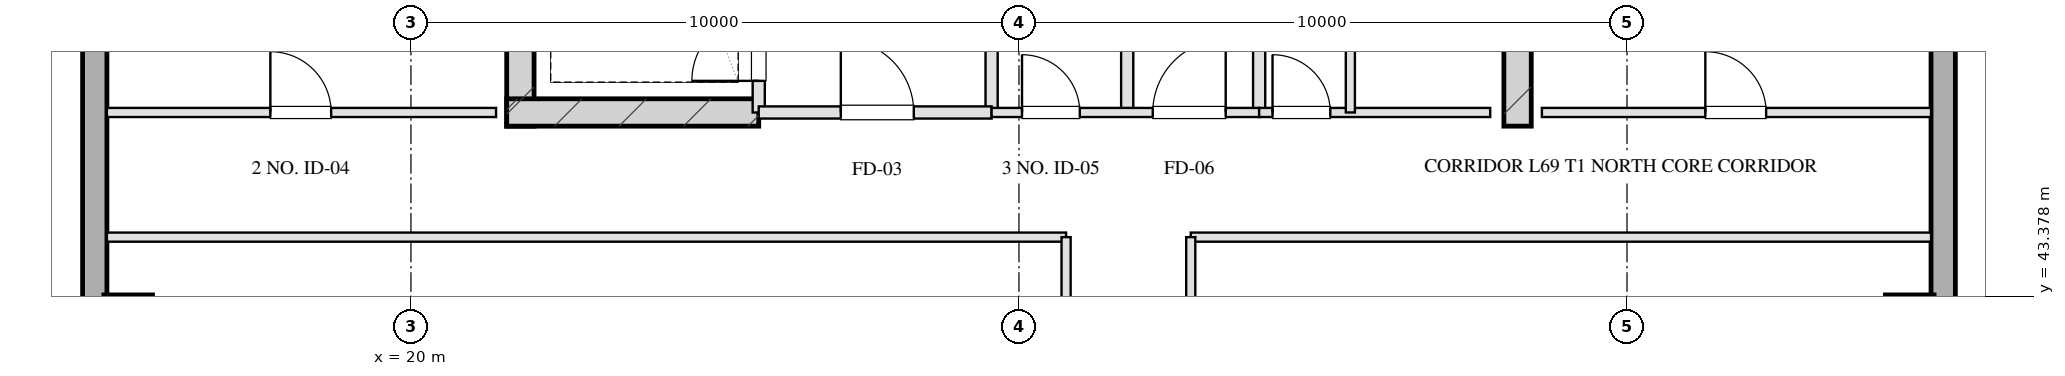
"""IFC4 building model, lengths in metres.
Left out: names, types, materials, properties, quantities, classifications, styles, units other than length and angle.
Written with IfcOpenShell. Run it as: python <this file> out.ifc"""

import sys

from ifc_helpers import new_model, si_unit, direction, frame, frame_2d, origin, origin_2d, place, context, subcontext, project, spatial, rectangle, hollow_rectangle, extrude, element, fill, save


model = new_model("IFC4")
c1 = context("Model", 3, precision=1e-05, world=origin(), true_north=direction((0.0, 1.0)))
c2 = subcontext(c1, "Body", "Model", "MODEL_VIEW")
j1 = project(units=[si_unit("LENGTHUNIT", "METRE"), si_unit("PLANEANGLEUNIT", "RADIAN")], contexts=[c1])
p1 = place(None, origin())
s1 = spatial("IfcSite", under=j1, at=p1, CompositionType="ELEMENT")
p2 = place(p1, origin())
s2 = spatial("IfcBuilding", under=s1, at=p2, CompositionType="ELEMENT")
p3 = place(p2, frame((0.0, 0.0, 253.6)))
s3 = spatial("IfcBuildingStorey", under=s2, at=p3, CompositionType="ELEMENT", Elevation=253.6)
for number, where, z_axis, x_axis in (
    (1, (21.8, 46.175, 0.0), (0.0, 0.0, 1.0), (0.0, 1.0, 0.0)),
    (2, (38.2, 46.175, 0.0), (0.0, 0.0, 1.0), (0.0, 1.0, 0.0)),
):
    element("IfcWall", number, at=place(p3, frame(where, z_axis=z_axis, x_axis=x_axis)), inside=s3, PredefinedType="SHEAR", context=c2, shape_type="SweptSolid", body=[
        extrude(rectangle(XDim=9.33, YDim=0.45, at=frame_2d((4.665, 0.0))), origin(), (0.0, 0.0, 1.0), 3.2),
    ])
p4 = place(p3, frame((21.575, 46.4, 0.0), z_axis=(0.0, 0.0, 1.0), x_axis=(1.0, 0.0, 0.0)))
e3 = element("IfcWall", 3, at=p4, inside=s3, PredefinedType="SHEAR", context=c2, shape_type="SweptSolid", body=[
    extrude(rectangle(XDim=4.145, YDim=0.45, at=frame_2d((2.073, 0.0))), origin(), (0.0, 0.0, 1.0), 3.2),
])
for number, where, z_axis, x_axis in (
    (4, (15.35, 43.0, 0.0), (0.0, 0.0, 1.0), (1.0, 0.0, 0.0)),
    (5, (44.65, 43.0, 0.0), (0.0, 0.0, 1.0), (1.0, 0.0, 0.0)),
):
    element("IfcColumn", number, at=place(p3, frame(where, z_axis=z_axis, x_axis=x_axis)), inside=s3, PredefinedType="COLUMN", context=c2, shape_type="SweptSolid", body=[
        extrude(hollow_rectangle(XDim=0.8, YDim=0.8, WallThickness=0.028, at=origin_2d()), origin(), (0.0, 0.0, 1.0), 3.201),
    ])
p5 = place(p3, frame((14.8, 13.1, 0.0), z_axis=(0.0, 0.0, 1.0), x_axis=(0.0, 1.0, 0.0)))
e6 = element("IfcWall", 6, at=p5, inside=s3, PredefinedType="SOLIDWALL", context=c2, shape_type="SweptSolid", body=[
    extrude(rectangle(XDim=41.8, YDim=0.4, at=frame_2d((20.9, 0.0))), origin(), (0.0, 0.0, 1.0), 2.36),
])
p6 = place(p5, frame((13.525, 0.0, 0.75)))
e7 = element("IfcOpeningElement", 7, at=p6, cuts=e6, PredefinedType="OPENING", context=c2, shape_type="SweptSolid", body=[
    extrude(rectangle(XDim=1.95, YDim=1.21, at=frame_2d((0.975, 0.605))), frame((0.0, 0.21, 0.0), z_axis=(0.0, -1.0, 0.0), x_axis=(1.0, 0.0, 0.0)), (0.0, 0.0, 1.0), 0.42),
])
p7 = place(p5, frame((17.325, 0.0, 0.75)))
e8 = element("IfcOpeningElement", 8, at=p7, cuts=e6, PredefinedType="OPENING", context=c2, shape_type="SweptSolid", body=[
    extrude(rectangle(XDim=1.95, YDim=1.21, at=frame_2d((0.975, 0.605))), frame((0.0, 0.21, 0.0), z_axis=(0.0, -1.0, 0.0), x_axis=(1.0, 0.0, 0.0)), (0.0, 0.0, 1.0), 0.42),
])
p8 = place(p5, frame((22.525, 0.0, 0.75)))
e9 = element("IfcOpeningElement", 9, at=p8, cuts=e6, PredefinedType="OPENING", context=c2, shape_type="SweptSolid", body=[
    extrude(rectangle(XDim=1.95, YDim=1.21, at=frame_2d((0.975, 0.605))), frame((0.0, 0.21, 0.0), z_axis=(0.0, -1.0, 0.0), x_axis=(1.0, 0.0, 0.0)), (0.0, 0.0, 1.0), 0.42),
])
p9 = place(p5, frame((26.325, 0.0, 0.75)))
e10 = element("IfcOpeningElement", 10, at=p9, cuts=e6, PredefinedType="OPENING", context=c2, shape_type="SweptSolid", body=[
    extrude(rectangle(XDim=1.95, YDim=1.21, at=frame_2d((0.975, 0.605))), frame((0.0, 0.21, 0.0), z_axis=(0.0, -1.0, 0.0), x_axis=(1.0, 0.0, 0.0)), (0.0, 0.0, 1.0), 0.42),
])
p10 = place(p3, frame((45.2, 54.9, 0.0), z_axis=(0.0, 0.0, 1.0), x_axis=(0.0, -1.0, 0.0)))
e11 = element("IfcWall", 11, at=p10, inside=s3, PredefinedType="SOLIDWALL", context=c2, shape_type="SweptSolid", body=[
    extrude(rectangle(XDim=41.8, YDim=0.4, at=frame_2d((20.9, 0.0))), origin(), (0.0, 0.0, 1.0), 2.36),
])
p11 = place(p10, frame((26.325, 0.0, 0.75)))
e12 = element("IfcOpeningElement", 12, at=p11, cuts=e11, PredefinedType="OPENING", context=c2, shape_type="SweptSolid", body=[
    extrude(rectangle(XDim=1.95, YDim=1.21, at=frame_2d((0.975, 0.605))), frame((0.0, 0.21, 0.0), z_axis=(0.0, -1.0, 0.0), x_axis=(1.0, 0.0, 0.0)), (0.0, 0.0, 1.0), 0.42),
])
p12 = place(p10, frame((22.525, 0.0, 0.75)))
e13 = element("IfcOpeningElement", 13, at=p12, cuts=e11, PredefinedType="OPENING", context=c2, shape_type="SweptSolid", body=[
    extrude(rectangle(XDim=1.95, YDim=1.21, at=frame_2d((0.975, 0.605))), frame((0.0, 0.21, 0.0), z_axis=(0.0, -1.0, 0.0), x_axis=(1.0, 0.0, 0.0)), (0.0, 0.0, 1.0), 0.42),
])
p13 = place(p10, frame((17.325, 0.0, 0.75)))
e14 = element("IfcOpeningElement", 14, at=p13, cuts=e11, PredefinedType="OPENING", context=c2, shape_type="SweptSolid", body=[
    extrude(rectangle(XDim=1.95, YDim=1.21, at=frame_2d((0.975, 0.605))), frame((0.0, 0.21, 0.0), z_axis=(0.0, -1.0, 0.0), x_axis=(1.0, 0.0, 0.0)), (0.0, 0.0, 1.0), 0.42),
])
p14 = place(p10, frame((13.525, 0.0, 0.75)))
e15 = element("IfcOpeningElement", 15, at=p14, cuts=e11, PredefinedType="OPENING", context=c2, shape_type="SweptSolid", body=[
    extrude(rectangle(XDim=1.95, YDim=1.21, at=frame_2d((0.975, 0.605))), frame((0.0, 0.21, 0.0), z_axis=(0.0, -1.0, 0.0), x_axis=(1.0, 0.0, 0.0)), (0.0, 0.0, 1.0), 0.42),
])
p15 = place(p3, frame((25.72, 46.4, 0.0), z_axis=(0.0, 0.0, 1.0), x_axis=(0.0, 1.0, 0.0)))
e16 = element("IfcWall", 16, at=p15, inside=s3, PredefinedType="PARTITIONING", context=c2, shape_type="SweptSolid", body=[
    extrude(rectangle(XDim=1.9, YDim=0.2, at=frame_2d((0.95, 0.0))), origin(), (0.0, 0.0, 1.0), 2.925),
])
p16 = place(p15, frame((0.52, 0.0, 0.0)))
e17 = element("IfcOpeningElement", 17, at=p16, cuts=e16, PredefinedType="OPENING", context=c2, shape_type="SweptSolid", body=[
    extrude(rectangle(XDim=1.1, YDim=2.05, at=frame_2d((0.55, 1.025))), frame((0.0, 0.11, 0.0), z_axis=(0.0, -1.0, 0.0), x_axis=(1.0, 0.0, 0.0)), (0.0, 0.0, 1.0), 0.22),
])
p17 = place(p3, frame((29.55, 46.4, 0.0), z_axis=(0.0, 0.0, 1.0), x_axis=(0.0, 1.0, 0.0)))
e18 = element("IfcWall", 18, at=p17, inside=s3, PredefinedType="PARTITIONING", context=c2, shape_type="SweptSolid", body=[
    extrude(rectangle(XDim=8.43, YDim=0.2, at=frame_2d((4.215, 0.0))), origin(), (0.0, 0.0, 1.0), 2.925),
])
p18 = place(p3, frame((25.72, 46.4, 0.0), z_axis=(0.0, 0.0, 1.0), x_axis=(1.0, 0.0, 0.0)))
e19 = element("IfcWall", 19, at=p18, inside=s3, PredefinedType="PARTITIONING", context=c2, shape_type="SweptSolid", body=[
    extrude(rectangle(XDim=3.83, YDim=0.2, at=frame_2d((1.915, 0.0))), origin(), (0.0, 0.0, 1.0), 2.925),
])
p19 = place(p18, frame((1.35, 0.0, 0.0)))
e20 = element("IfcOpeningElement", 20, at=p19, cuts=e19, PredefinedType="OPENING", context=c2, shape_type="SweptSolid", body=[
    extrude(rectangle(XDim=1.2, YDim=2.05, at=frame_2d((0.6, 1.025))), frame((0.0, 0.11, 0.0), z_axis=(0.0, -1.0, 0.0), x_axis=(1.0, 0.0, 0.0)), (0.0, 0.0, 1.0), 0.22),
])
for number, where, z_axis, x_axis in (
    (21, (33.95, 46.4, 0.0), (0.0, 0.0, 1.0), (0.0, 1.0, 0.0)),
    (22, (31.78, 46.4, 0.0), (0.0, 0.0, 1.0), (0.0, 1.0, 0.0)),
):
    element("IfcWall", number, at=place(p3, frame(where, z_axis=z_axis, x_axis=x_axis)), inside=s3, PredefinedType="PARTITIONING", context=c2, shape_type="SweptSolid", body=[
        extrude(rectangle(XDim=8.43, YDim=0.2, at=frame_2d((4.215, 0.0))), origin(), (0.0, 0.0, 1.0), 2.925),
    ])
p20 = place(p3, frame((29.55, 46.4, 0.0), z_axis=(0.0, 0.0, 1.0), x_axis=(1.0, 0.0, 0.0)))
e23 = element("IfcWall", 23, at=p20, inside=s3, PredefinedType="PARTITIONING", context=c2, shape_type="SweptSolid", body=[
    extrude(rectangle(XDim=4.4, YDim=0.15, at=frame_2d((2.2, 0.0))), origin(), (0.0, 0.0, 1.0), 2.925),
])
p21 = place(p20, frame((0.5, 0.0, 0.0)))
e24 = element("IfcOpeningElement", 24, at=p21, cuts=e23, PredefinedType="OPENING", context=c2, shape_type="SweptSolid", body=[
    extrude(rectangle(XDim=0.95, YDim=2.05, at=frame_2d((0.475, 1.025))), frame((0.0, 0.085, 0.0), z_axis=(0.0, -1.0, 0.0), x_axis=(1.0, 0.0, 0.0)), (0.0, 0.0, 1.0), 0.17),
])
p22 = place(p20, frame((2.65, 0.0, 0.0)))
e25 = element("IfcOpeningElement", 25, at=p22, cuts=e23, PredefinedType="OPENING", context=c2, shape_type="SweptSolid", body=[
    extrude(rectangle(XDim=1.2, YDim=2.05, at=frame_2d((0.6, 1.025))), frame((0.0, 0.085, 0.0), z_axis=(0.0, -1.0, 0.0), x_axis=(1.0, 0.0, 0.0)), (0.0, 0.0, 1.0), 0.17),
])
p23 = place(p3, frame((33.95, 46.4, 0.0), z_axis=(0.0, 0.0, 1.0), x_axis=(1.0, 0.0, 0.0)))
e26 = element("IfcWall", 26, at=p23, inside=s3, PredefinedType="PARTITIONING", context=c2, shape_type="SweptSolid", body=[
    extrude(rectangle(XDim=3.8, YDim=0.15, at=frame_2d((1.9, 0.0))), origin(), (0.0, 0.0, 1.0), 2.925),
])
p24 = place(p23, frame((0.22, 0.0, 0.0)))
e27 = element("IfcOpeningElement", 27, at=p24, cuts=e26, PredefinedType="OPENING", context=c2, shape_type="SweptSolid", body=[
    extrude(rectangle(XDim=0.95, YDim=2.05, at=frame_2d((0.475, 1.025))), frame((0.0, 0.085, 0.0), z_axis=(0.0, -1.0, 0.0), x_axis=(1.0, 0.0, 0.0)), (0.0, 0.0, 1.0), 0.17),
])
p25 = place(p3, frame((35.45, 46.4, 0.0), z_axis=(0.0, 0.0, 1.0), x_axis=(0.0, 1.0, 0.0)))
e28 = element("IfcWall", 28, at=p25, inside=s3, PredefinedType="PARTITIONING", context=c2, shape_type="SweptSolid", body=[
    extrude(rectangle(XDim=8.43, YDim=0.15, at=frame_2d((4.215, 0.0))), origin(), (0.0, 0.0, 1.0), 2.565),
])
p26 = place(p25, frame((2.55, 0.0, 0.0)))
e29 = element("IfcOpeningElement", 29, at=p26, cuts=e28, PredefinedType="OPENING", context=c2, shape_type="SweptSolid", body=[
    extrude(rectangle(XDim=0.95, YDim=2.05, at=frame_2d((0.475, 1.025))), frame((0.0, 0.085, 0.0), z_axis=(0.0, -1.0, 0.0), x_axis=(1.0, 0.0, 0.0)), (0.0, 0.0, 1.0), 0.17),
])
p27 = place(p25, frame((5.8, 0.0, 0.0)))
e30 = element("IfcOpeningElement", 30, at=p27, cuts=e28, PredefinedType="OPENING", context=c2, shape_type="SweptSolid", body=[
    extrude(rectangle(XDim=0.9, YDim=2.05, at=frame_2d((0.45, 1.025))), frame((0.0, 0.085, 0.0), z_axis=(0.0, -1.0, 0.0), x_axis=(1.0, 0.0, 0.0)), (0.0, 0.0, 1.0), 0.17),
])
p28 = place(p3, frame((15.0, 46.4, 0.0), z_axis=(0.0, 0.0, 1.0), x_axis=(1.0, 0.0, 0.0)))
e31 = element("IfcWall", 31, at=p28, inside=s3, PredefinedType="PARTITIONING", context=c2, shape_type="SweptSolid", body=[
    extrude(rectangle(XDim=6.4, YDim=0.15, at=frame_2d((3.2, 0.0))), origin(), (0.0, 0.0, 1.0), 2.925),
])
p29 = place(p28, frame((2.688, 0.0, 0.0)))
e32 = element("IfcOpeningElement", 32, at=p29, cuts=e31, PredefinedType="OPENING", context=c2, shape_type="SweptSolid", body=[
    extrude(rectangle(XDim=1.0, YDim=2.05, at=frame_2d((0.5, 1.025))), frame((0.0, 0.085, 0.0), z_axis=(0.0, -1.0, 0.0), x_axis=(1.0, 0.0, 0.0)), (0.0, 0.0, 1.0), 0.17),
])
p30 = place(p3, frame((38.6, 46.4, 0.0), z_axis=(0.0, 0.0, 1.0), x_axis=(1.0, 0.0, 0.0)))
e33 = element("IfcWall", 33, at=p30, inside=s3, PredefinedType="PARTITIONING", context=c2, shape_type="SweptSolid", body=[
    extrude(rectangle(XDim=6.4, YDim=0.15, at=frame_2d((3.2, 0.0))), origin(), (0.0, 0.0, 1.0), 2.925),
])
p31 = place(p30, frame((2.688, 0.0, 0.0)))
e34 = element("IfcOpeningElement", 34, at=p31, cuts=e33, PredefinedType="OPENING", context=c2, shape_type="SweptSolid", body=[
    extrude(rectangle(XDim=1.0, YDim=2.05, at=frame_2d((0.5, 1.025))), frame((0.0, 0.085, 0.0), z_axis=(0.0, -1.0, 0.0), x_axis=(1.0, 0.0, 0.0)), (0.0, 0.0, 1.0), 0.17),
])
p32 = place(p3, frame((15.0, 44.35, 0.0), z_axis=(0.0, 0.0, 1.0), x_axis=(1.0, 0.0, 0.0)))
e35 = element("IfcWall", 35, at=p32, inside=s3, PredefinedType="PARTITIONING", context=c2, shape_type="SweptSolid", body=[
    extrude(rectangle(XDim=15.775, YDim=0.15, at=frame_2d((7.887, 0.0))), origin(), (0.0, 0.0, 1.0), 2.925),
])
p33 = place(p3, frame((32.825, 44.35, 0.0), z_axis=(0.0, 0.0, 1.0), x_axis=(1.0, 0.0, 0.0)))
e36 = element("IfcWall", 36, at=p33, inside=s3, PredefinedType="PARTITIONING", context=c2, shape_type="SweptSolid", body=[
    extrude(rectangle(XDim=12.175, YDim=0.15, at=frame_2d((6.087, 0.0))), origin(), (0.0, 0.0, 1.0), 2.925),
])
p34 = place(p3, frame((30.775, 23.65, 0.0), z_axis=(0.0, 0.0, 1.0), x_axis=(0.0, 1.0, 0.0)))
e37 = element("IfcWall", 37, at=p34, inside=s3, PredefinedType="PARTITIONING", context=c2, shape_type="SweptSolid", body=[
    extrude(rectangle(XDim=20.7, YDim=0.15, at=frame_2d((10.35, 0.0))), origin(), (0.0, 0.0, 1.0), 2.925),
])
p35 = place(p34, frame((2.175, 0.0, 0.0)))
e38 = element("IfcOpeningElement", 38, at=p35, cuts=e37, PredefinedType="OPENING", context=c2, shape_type="SweptSolid", body=[
    extrude(rectangle(XDim=1.0, YDim=2.05, at=frame_2d((0.5, 1.025))), frame((0.0, 0.085, 0.0), z_axis=(0.0, -1.0, 0.0), x_axis=(1.0, 0.0, 0.0)), (0.0, 0.0, 1.0), 0.17),
])
p36 = place(p34, frame((7.69, 0.0, 0.0)))
e39 = element("IfcOpeningElement", 39, at=p36, cuts=e37, PredefinedType="OPENING", context=c2, shape_type="SweptSolid", body=[
    extrude(rectangle(XDim=1.0, YDim=2.05, at=frame_2d((0.5, 1.025))), frame((0.0, 0.085, 0.0), z_axis=(0.0, -1.0, 0.0), x_axis=(1.0, 0.0, 0.0)), (0.0, 0.0, 1.0), 0.17),
])
p37 = place(p34, frame((12.69, 0.0, 0.0)))
e40 = element("IfcOpeningElement", 40, at=p37, cuts=e37, PredefinedType="OPENING", context=c2, shape_type="SweptSolid", body=[
    extrude(rectangle(XDim=1.0, YDim=2.05, at=frame_2d((0.5, 1.025))), frame((0.0, 0.085, 0.0), z_axis=(0.0, -1.0, 0.0), x_axis=(1.0, 0.0, 0.0)), (0.0, 0.0, 1.0), 0.17),
])
p38 = place(p34, frame((17.525, 0.0, 0.0)))
e41 = element("IfcOpeningElement", 41, at=p38, cuts=e37, PredefinedType="OPENING", context=c2, shape_type="SweptSolid", body=[
    extrude(rectangle(XDim=1.05, YDim=2.05, at=frame_2d((0.525, 1.025))), frame((0.0, 0.085, 0.0), z_axis=(0.0, -1.0, 0.0), x_axis=(1.0, 0.0, 0.0)), (0.0, 0.0, 1.0), 0.17),
])
p39 = place(p3, frame((32.825, 23.65, 0.0), z_axis=(0.0, 0.0, 1.0), x_axis=(0.0, 1.0, 0.0)))
e42 = element("IfcWall", 42, at=p39, inside=s3, PredefinedType="PARTITIONING", context=c2, shape_type="SweptSolid", body=[
    extrude(rectangle(XDim=20.7, YDim=0.15, at=frame_2d((10.35, 0.0))), origin(), (0.0, 0.0, 1.0), 2.925),
])
p40 = place(p39, frame((2.675, 0.0, 0.0)))
e43 = element("IfcOpeningElement", 43, at=p40, cuts=e42, PredefinedType="OPENING", context=c2, shape_type="SweptSolid", body=[
    extrude(rectangle(XDim=1.0, YDim=2.05, at=frame_2d((0.5, 1.025))), frame((0.0, 0.085, 0.0), z_axis=(0.0, -1.0, 0.0), x_axis=(1.0, 0.0, 0.0)), (0.0, 0.0, 1.0), 0.17),
])
p41 = place(p39, frame((9.85, 0.0, 0.0)))
e44 = element("IfcOpeningElement", 44, at=p41, cuts=e42, PredefinedType="OPENING", context=c2, shape_type="SweptSolid", body=[
    extrude(rectangle(XDim=1.0, YDim=2.05, at=frame_2d((0.5, 1.025))), frame((0.0, 0.085, 0.0), z_axis=(0.0, -1.0, 0.0), x_axis=(1.0, 0.0, 0.0)), (0.0, 0.0, 1.0), 0.17),
])
p42 = place(p39, frame((17.025, 0.0, 0.0)))
e45 = element("IfcOpeningElement", 45, at=p42, cuts=e42, PredefinedType="OPENING", context=c2, shape_type="SweptSolid", body=[
    extrude(rectangle(XDim=1.0, YDim=2.05, at=frame_2d((0.5, 1.025))), frame((0.0, 0.085, 0.0), z_axis=(0.0, -1.0, 0.0), x_axis=(1.0, 0.0, 0.0)), (0.0, 0.0, 1.0), 0.17),
])
p43 = place(p16, origin())
e46 = element("IfcDoor", 46, at=p43, inside=s3, OperationType="SINGLE_SWING_LEFT", PredefinedType="DOOR", context=c2, shape_type="SweptSolid", body=[
    extrude(rectangle(XDim=1.1, YDim=2.05, at=frame_2d((0.55, 1.025))), frame((0.0, 0.025, 0.0), z_axis=(0.0, -1.0, 0.0), x_axis=(1.0, 0.0, 0.0)), (0.0, 0.0, 1.0), 0.05),
])
fill(e17, e46)
p44 = place(p19, origin())
e47 = element("IfcDoor", 47, at=p44, inside=s3, OperationType="SINGLE_SWING_LEFT", PredefinedType="DOOR", context=c2, shape_type="SweptSolid", body=[
    extrude(rectangle(XDim=1.2, YDim=2.05, at=frame_2d((0.6, 1.025))), frame((0.0, 0.025, 0.0), z_axis=(0.0, -1.0, 0.0), x_axis=(1.0, 0.0, 0.0)), (0.0, 0.0, 1.0), 0.05),
])
fill(e20, e47)
p45 = place(p21, origin())
e48 = element("IfcDoor", 48, at=p45, inside=s3, OperationType="SINGLE_SWING_LEFT", PredefinedType="DOOR", context=c2, shape_type="SweptSolid", body=[
    extrude(rectangle(XDim=0.95, YDim=2.05, at=frame_2d((0.475, 1.025))), frame((0.0, 0.025, 0.0), z_axis=(0.0, -1.0, 0.0), x_axis=(1.0, 0.0, 0.0)), (0.0, 0.0, 1.0), 0.05),
])
fill(e24, e48)
p46 = place(p22, origin())
e49 = element("IfcDoor", 49, at=p46, inside=s3, OperationType="SINGLE_SWING_RIGHT", PredefinedType="DOOR", context=c2, shape_type="SweptSolid", body=[
    extrude(rectangle(XDim=1.2, YDim=2.05, at=frame_2d((0.6, 1.025))), frame((0.0, 0.025, 0.0), z_axis=(0.0, -1.0, 0.0), x_axis=(1.0, 0.0, 0.0)), (0.0, 0.0, 1.0), 0.05),
])
fill(e25, e49)
p47 = place(p24, origin())
e50 = element("IfcDoor", 50, at=p47, inside=s3, OperationType="SINGLE_SWING_LEFT", PredefinedType="DOOR", context=c2, shape_type="SweptSolid", body=[
    extrude(rectangle(XDim=0.95, YDim=2.05, at=frame_2d((0.475, 1.025))), frame((0.0, 0.025, 0.0), z_axis=(0.0, -1.0, 0.0), x_axis=(1.0, 0.0, 0.0)), (0.0, 0.0, 1.0), 0.05),
])
fill(e27, e50)
p48 = place(p29, origin())
e51 = element("IfcDoor", 51, at=p48, inside=s3, OperationType="SINGLE_SWING_LEFT", PredefinedType="DOOR", context=c2, shape_type="SweptSolid", body=[
    extrude(rectangle(XDim=1.0, YDim=2.05, at=frame_2d((0.5, 1.025))), frame((0.0, 0.025, 0.0), z_axis=(0.0, -1.0, 0.0), x_axis=(1.0, 0.0, 0.0)), (0.0, 0.0, 1.0), 0.05),
])
fill(e32, e51)
p49 = place(p31, origin())
e52 = element("IfcDoor", 52, at=p49, inside=s3, OperationType="SINGLE_SWING_LEFT", PredefinedType="DOOR", context=c2, shape_type="SweptSolid", body=[
    extrude(rectangle(XDim=1.0, YDim=2.05, at=frame_2d((0.5, 1.025))), frame((0.0, 0.025, 0.0), z_axis=(0.0, -1.0, 0.0), x_axis=(1.0, 0.0, 0.0)), (0.0, 0.0, 1.0), 0.05),
])
fill(e34, e52)
save(model, sys.argv[1])
